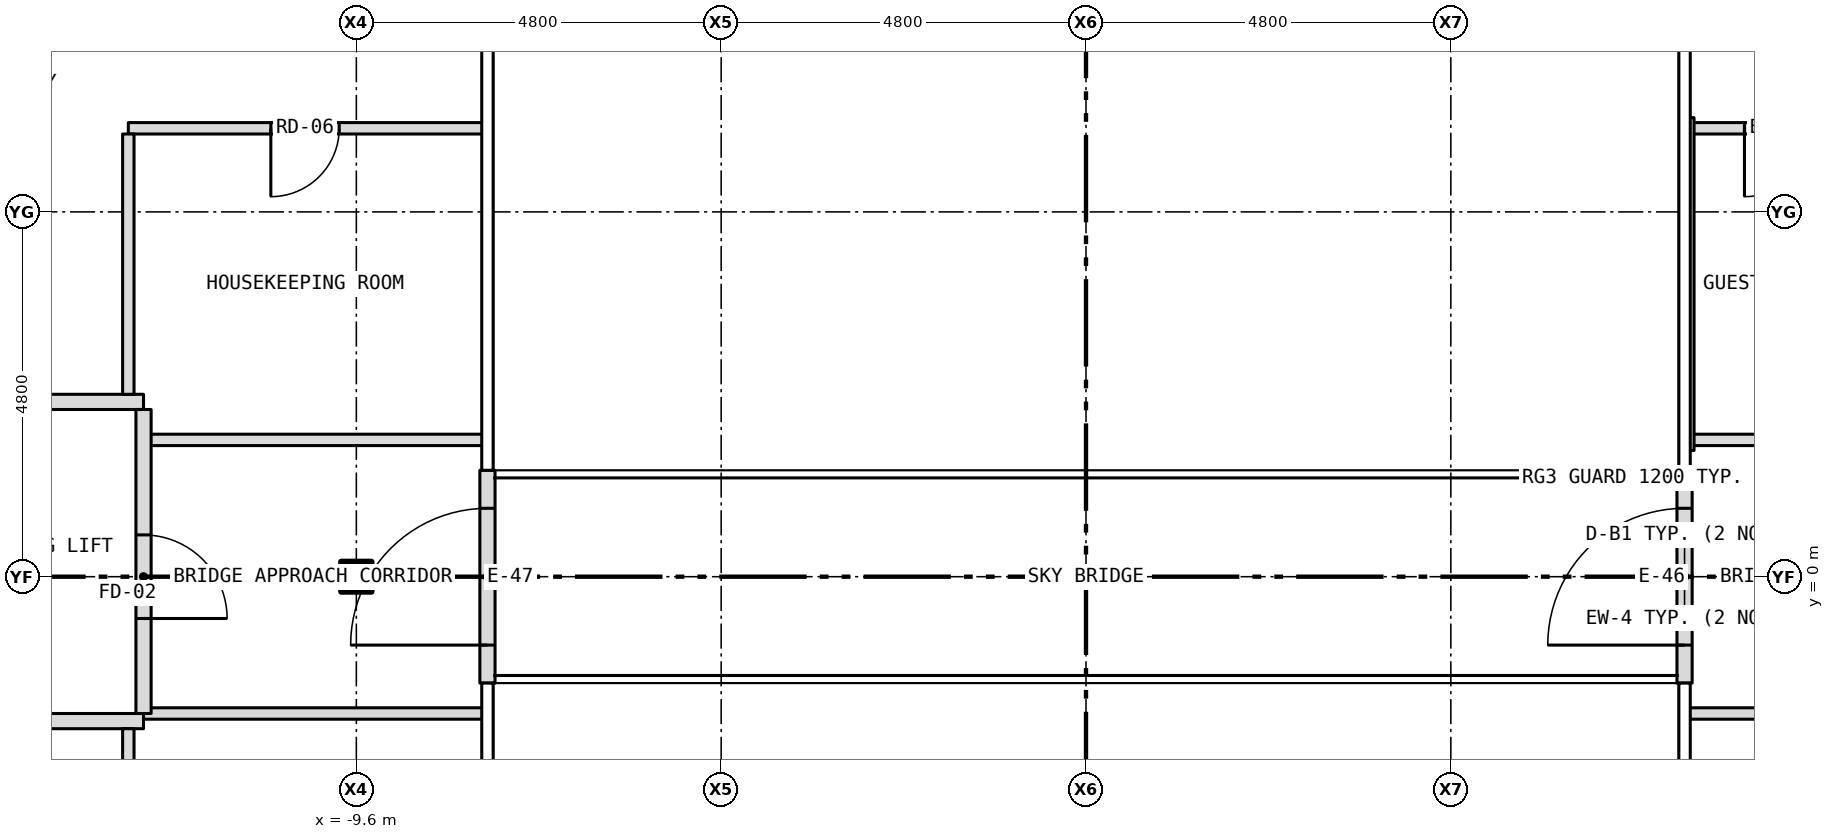
"""IFC4 building model, lengths in metres.
Left out: names, types, materials, properties, quantities, classifications, styles, units other than length and angle.
Written with IfcOpenShell. Run it as: python <this file> out.ifc"""

import sys

from ifc_helpers import new_model, si_unit, direction, frame, frame_2d, origin, origin_2d, place, context, subcontext, project, spatial, rectangle, i_section, extrude, element, fill, save


model = new_model("IFC4")
c1 = context("Model", 3, precision=1e-05, world=origin(), true_north=direction((0.0, 1.0)))
c2 = subcontext(c1, "Body", "Model", "MODEL_VIEW")
j1 = project(units=[si_unit("LENGTHUNIT", "METRE"), si_unit("PLANEANGLEUNIT", "RADIAN")], contexts=[c1])
p1 = place(None, origin())
s1 = spatial("IfcSite", under=j1, at=p1, CompositionType="ELEMENT")
p2 = place(p1, origin())
s2 = spatial("IfcBuilding", under=s1, at=p2, CompositionType="ELEMENT")
p3 = place(p2, frame((0.0, 0.0, 120.5)))
s3 = spatial("IfcBuildingStorey", under=s2, at=p3, CompositionType="ELEMENT", Elevation=120.5)
p4 = place(p3, frame((-9.6, 0.0, -0.15), z_axis=(0.0, 0.0, 1.0), x_axis=(1.0, 0.0, 0.0)))
e1 = element("IfcColumn", 1, at=p4, inside=s3, PredefinedType="COLUMN", context=c2, shape_type="SweptSolid", body=[
    extrude(i_section(OverallWidth=0.399, OverallDepth=0.394, WebThickness=0.023, FlangeThickness=0.037, at=origin_2d()), origin(), (0.0, 0.0, 1.0), 3.5),
])
p5 = place(p3, frame((7.875, -1.4, 0.0), z_axis=(0.0, 0.0, 1.0), x_axis=(0.0, 1.0, 0.0)))
e2 = element("IfcWall", 2, at=p5, inside=s3, PredefinedType="SOLIDWALL", context=c2, shape_type="SweptSolid", body=[
    extrude(rectangle(XDim=2.8, YDim=0.2, at=frame_2d((1.4, 0.0))), origin(), (0.0, 0.0, 1.0), 3.5),
])
p6 = place(p5, frame((0.5, 0.0, 0.0)))
e3 = element("IfcOpeningElement", 3, at=p6, cuts=e2, PredefinedType="OPENING", context=c2, shape_type="SweptSolid", body=[
    extrude(rectangle(XDim=1.8, YDim=2.1, at=frame_2d((0.9, 1.05))), frame((0.0, 0.112, 0.0), z_axis=(0.0, -1.0, 0.0), x_axis=(1.0, 0.0, 0.0)), (0.0, 0.0, 1.0), 0.224),
])
p7 = place(p3, frame((-7.875, -1.4, 0.0), z_axis=(0.0, 0.0, 1.0), x_axis=(0.0, 1.0, 0.0)))
e4 = element("IfcWall", 4, at=p7, inside=s3, PredefinedType="SOLIDWALL", context=c2, shape_type="SweptSolid", body=[
    extrude(rectangle(XDim=2.8, YDim=0.2, at=frame_2d((1.4, 0.0))), origin(), (0.0, 0.0, 1.0), 3.5),
])
p8 = place(p7, frame((0.5, 0.0, 0.0)))
e5 = element("IfcOpeningElement", 5, at=p8, cuts=e4, PredefinedType="OPENING", context=c2, shape_type="SweptSolid", body=[
    extrude(rectangle(XDim=1.8, YDim=2.1, at=frame_2d((0.9, 1.05))), frame((0.0, 0.112, 0.0), z_axis=(0.0, -1.0, 0.0), x_axis=(1.0, 0.0, 0.0)), (0.0, 0.0, 1.0), 0.224),
])
p9 = place(p3, frame((-15.68, -1.9, 0.0), z_axis=(0.0, 0.0, 1.0), x_axis=(1.0, 0.0, 0.0)))
e6 = element("IfcWall", 6, at=p9, inside=s3, PredefinedType="PARTITIONING", context=c2, shape_type="SweptSolid", body=[
    extrude(rectangle(XDim=3.28, YDim=0.2, at=frame_2d((1.64, 0.0))), origin(), (0.0, 0.0, 1.0), 3.35),
])
p10 = place(p9, frame((0.94, 0.0, 0.0)))
e7 = element("IfcOpeningElement", 7, at=p10, cuts=e6, PredefinedType="OPENING", context=c2, shape_type="SweptSolid", body=[
    extrude(rectangle(XDim=1.1, YDim=2.1, at=frame_2d((0.55, 1.05))), frame((0.0, 0.112, 0.0), z_axis=(0.0, -1.0, 0.0), x_axis=(1.0, 0.0, 0.0)), (0.0, 0.0, 1.0), 0.224),
])
for number, where, z_axis, x_axis in (
    (8, (-12.4, -1.8, 0.0), (0.0, 0.0, 1.0), (1.0, 0.0, 0.0)),
    (9, (7.92, -1.8, 0.0), (0.0, 0.0, 1.0), (1.0, 0.0, 0.0)),
    (10, (-12.4, 1.8, 0.0), (0.0, 0.0, 1.0), (1.0, 0.0, 0.0)),
):
    element("IfcWall", number, at=place(p3, frame(where, z_axis=z_axis, x_axis=x_axis)), inside=s3, PredefinedType="PARTITIONING", context=c2, shape_type="SweptSolid", body=[
        extrude(rectangle(XDim=4.48, YDim=0.15, at=frame_2d((2.24, 0.0))), origin(), (0.0, 0.0, 1.0), 3.35),
    ])
p11 = place(p3, frame((7.95, 1.8, 0.0), z_axis=(0.0, 0.0, 1.0), x_axis=(1.0, 0.0, 0.0)))
e11 = element("IfcWall", 11, at=p11, inside=s3, PredefinedType="PARTITIONING", context=c2, shape_type="SweptSolid", body=[
    extrude(rectangle(XDim=4.45, YDim=0.15, at=frame_2d((2.225, 0.0))), origin(), (0.0, 0.0, 1.0), 3.35),
])
p12 = place(p3, frame((-15.68, 2.3, 0.0), z_axis=(0.0, 0.0, 1.0), x_axis=(1.0, 0.0, 0.0)))
e12 = element("IfcWall", 12, at=p12, inside=s3, PredefinedType="PARTITIONING", context=c2, shape_type="SweptSolid", body=[
    extrude(rectangle(XDim=3.28, YDim=0.2, at=frame_2d((1.64, 0.0))), origin(), (0.0, 0.0, 1.0), 3.35),
])
p13 = place(p12, frame((0.84, 0.0, 0.0)))
e13 = element("IfcOpeningElement", 13, at=p13, cuts=e12, PredefinedType="OPENING", context=c2, shape_type="SweptSolid", body=[
    extrude(rectangle(XDim=1.1, YDim=2.1, at=frame_2d((0.55, 1.05))), frame((0.0, 0.112, 0.0), z_axis=(0.0, -1.0, 0.0), x_axis=(1.0, 0.0, 0.0)), (0.0, 0.0, 1.0), 0.224),
])
p14 = place(p3, frame((-12.6, 5.9, 0.0), z_axis=(0.0, 0.0, 1.0), x_axis=(1.0, 0.0, 0.0)))
e14 = element("IfcWall", 14, at=p14, inside=s3, PredefinedType="PARTITIONING", context=c2, shape_type="SweptSolid", body=[
    extrude(rectangle(XDim=4.68, YDim=0.15, at=frame_2d((2.34, 0.0))), origin(), (0.0, 0.0, 1.0), 3.35),
])
p15 = place(p14, frame((1.875, 0.0, 0.0)))
e15 = element("IfcOpeningElement", 15, at=p15, cuts=e14, PredefinedType="OPENING", context=c2, shape_type="SweptSolid", body=[
    extrude(rectangle(XDim=0.9, YDim=2.1, at=frame_2d((0.45, 1.05))), frame((0.0, 0.087, 0.0), z_axis=(0.0, -1.0, 0.0), x_axis=(1.0, 0.0, 0.0)), (0.0, 0.0, 1.0), 0.174),
])
p16 = place(p3, frame((7.95, 5.9, 0.0), z_axis=(0.0, 0.0, 1.0), x_axis=(1.0, 0.0, 0.0)))
e16 = element("IfcWall", 16, at=p16, inside=s3, PredefinedType="PARTITIONING", context=c2, shape_type="SweptSolid", body=[
    extrude(rectangle(XDim=4.65, YDim=0.15, at=frame_2d((2.325, 0.0))), origin(), (0.0, 0.0, 1.0), 3.35),
])
p17 = place(p16, frame((0.713, 0.0, 0.0)))
e17 = element("IfcOpeningElement", 17, at=p17, cuts=e16, PredefinedType="OPENING", context=c2, shape_type="SweptSolid", body=[
    extrude(rectangle(XDim=0.9, YDim=2.1, at=frame_2d((0.45, 1.05))), frame((0.0, 0.087, 0.0), z_axis=(0.0, -1.0, 0.0), x_axis=(1.0, 0.0, 0.0)), (0.0, 0.0, 1.0), 0.174),
])
p18 = place(p16, frame((3.037, 0.0, 0.0)))
e18 = element("IfcOpeningElement", 18, at=p18, cuts=e16, PredefinedType="OPENING", context=c2, shape_type="SweptSolid", body=[
    extrude(rectangle(XDim=0.9, YDim=2.1, at=frame_2d((0.45, 1.05))), frame((0.0, 0.087, 0.0), z_axis=(0.0, -1.0, 0.0), x_axis=(1.0, 0.0, 0.0)), (0.0, 0.0, 1.0), 0.174),
])
p19 = place(p3, frame((-12.6, -12.525, 0.0), z_axis=(0.0, 0.0, 1.0), x_axis=(0.0, 1.0, 0.0)))
e19 = element("IfcWall", 19, at=p19, inside=s3, PredefinedType="PARTITIONING", context=c2, shape_type="SweptSolid", body=[
    extrude(rectangle(XDim=10.525, YDim=0.15, at=frame_2d((5.262, 0.0))), origin(), (0.0, 0.0, 1.0), 3.35),
])
p20 = place(p19, frame((4.825, 0.0, 0.0)))
e20 = element("IfcOpeningElement", 20, at=p20, cuts=e19, PredefinedType="OPENING", context=c2, shape_type="SweptSolid", body=[
    extrude(rectangle(XDim=0.9, YDim=2.1, at=frame_2d((0.45, 1.05))), frame((0.0, 0.087, 0.0), z_axis=(0.0, -1.0, 0.0), x_axis=(1.0, 0.0, 0.0)), (0.0, 0.0, 1.0), 0.174),
])
p21 = place(p3, frame((-12.6, 2.4, 0.0), z_axis=(0.0, 0.0, 1.0), x_axis=(0.0, 1.0, 0.0)))
e21 = element("IfcWall", 21, at=p21, inside=s3, PredefinedType="PARTITIONING", context=c2, shape_type="SweptSolid", body=[
    extrude(rectangle(XDim=3.425, YDim=0.15, at=frame_2d((1.712, 0.0))), origin(), (0.0, 0.0, 1.0), 3.35),
])
p22 = place(p3, frame((-12.4, -1.8, 0.0), z_axis=(0.0, 0.0, 1.0), x_axis=(0.0, 1.0, 0.0)))
e22 = element("IfcWall", 22, at=p22, inside=s3, PredefinedType="PARTITIONING", context=c2, shape_type="SweptSolid", body=[
    extrude(rectangle(XDim=4.0, YDim=0.2, at=frame_2d((2.0, 0.0))), origin(), (0.0, 0.0, 1.0), 3.35),
])
p23 = place(p22, frame((1.25, 0.0, 0.0)))
e23 = element("IfcOpeningElement", 23, at=p23, cuts=e22, PredefinedType="OPENING", context=c2, shape_type="SweptSolid", body=[
    extrude(rectangle(XDim=1.1, YDim=2.1, at=frame_2d((0.55, 1.05))), frame((0.0, 0.112, 0.0), z_axis=(0.0, -1.0, 0.0), x_axis=(1.0, 0.0, 0.0)), (0.0, 0.0, 1.0), 0.224),
])
p24 = place(p3, frame((7.95, 1.66, 0.0), z_axis=(0.0, 0.0, 1.0), x_axis=(0.0, 1.0, 0.0)))
e24 = element("IfcWall", 24, at=p24, inside=s3, PredefinedType="PARTITIONING", context=c2, shape_type="SweptSolid", body=[
    extrude(rectangle(XDim=4.38, YDim=0.1, at=frame_2d((2.19, 0.0))), origin(), (0.0, 0.0, 1.0), 2.733),
])
p25 = place(p6, origin())
e25 = element("IfcDoor", 25, at=p25, inside=s3, OperationType="DOUBLE_DOOR_DOUBLE_SWING", PredefinedType="DOOR", context=c2, shape_type="SweptSolid", body=[
    extrude(rectangle(XDim=1.8, YDim=2.1, at=frame_2d((0.9, 1.05))), frame((0.0, 0.025, 0.0), z_axis=(0.0, -1.0, 0.0), x_axis=(1.0, 0.0, 0.0)), (0.0, 0.0, 1.0), 0.05),
])
fill(e3, e25)
p26 = place(p8, origin())
e26 = element("IfcDoor", 26, at=p26, inside=s3, OperationType="DOUBLE_DOOR_DOUBLE_SWING", PredefinedType="DOOR", context=c2, shape_type="SweptSolid", body=[
    extrude(rectangle(XDim=1.8, YDim=2.1, at=frame_2d((0.9, 1.05))), frame((0.0, 0.025, 0.0), z_axis=(0.0, -1.0, 0.0), x_axis=(1.0, 0.0, 0.0)), (0.0, 0.0, 1.0), 0.05),
])
fill(e5, e26)
p27 = place(p23, origin())
e27 = element("IfcDoor", 27, at=p27, inside=s3, OperationType="SINGLE_SWING_LEFT", PredefinedType="DOOR", context=c2, shape_type="SweptSolid", body=[
    extrude(rectangle(XDim=1.1, YDim=2.1, at=frame_2d((0.55, 1.05))), frame((0.0, 0.025, 0.0), z_axis=(0.0, -1.0, 0.0), x_axis=(1.0, 0.0, 0.0)), (0.0, 0.0, 1.0), 0.05),
])
fill(e23, e27)
p28 = place(p17, origin())
e28 = element("IfcDoor", 28, at=p28, inside=s3, OperationType="SINGLE_SWING_LEFT", PredefinedType="DOOR", context=c2, shape_type="SweptSolid", body=[
    extrude(rectangle(XDim=0.9, YDim=2.1, at=frame_2d((0.45, 1.05))), frame((0.0, 0.025, 0.0), z_axis=(0.0, -1.0, 0.0), x_axis=(1.0, 0.0, 0.0)), (0.0, 0.0, 1.0), 0.05),
])
fill(e17, e28)
p29 = place(p15, origin())
e29 = element("IfcDoor", 29, at=p29, inside=s3, OperationType="SINGLE_SWING_LEFT", PredefinedType="DOOR", context=c2, shape_type="SweptSolid", body=[
    extrude(rectangle(XDim=0.9, YDim=2.1, at=frame_2d((0.45, 1.05))), frame((0.0, 0.025, 0.0), z_axis=(0.0, -1.0, 0.0), x_axis=(1.0, 0.0, 0.0)), (0.0, 0.0, 1.0), 0.05),
])
fill(e15, e29)
save(model, sys.argv[1])
